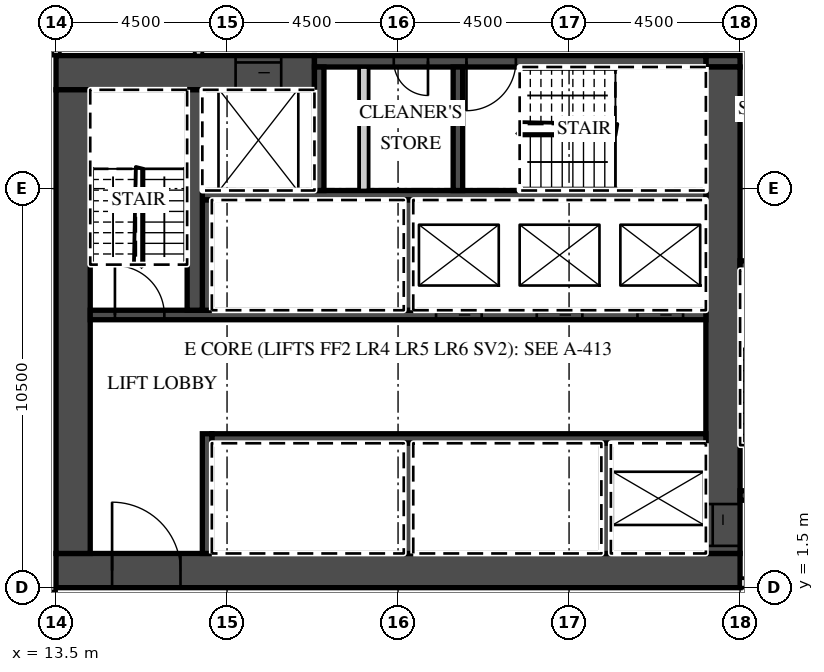
"""IFC4 building model, lengths in metres.
Left out: names, types, materials, properties, quantities, classifications, styles, units other than length and angle.
Written with IfcOpenShell. Run it as: python <this file> out.ifc"""

import sys

from ifc_helpers import new_model, si_unit, direction, frame, frame_2d, origin, place, context, subcontext, project, spatial, rectangle, extrude, element, fill, save


model = new_model("IFC4")
c1 = context("Model", 3, precision=1e-05, world=origin(), true_north=direction((0.0, 1.0)))
c2 = subcontext(c1, "Body", "Model", "MODEL_VIEW")
j1 = project(units=[si_unit("LENGTHUNIT", "METRE"), si_unit("PLANEANGLEUNIT", "RADIAN")], contexts=[c1])
p1 = place(None, origin())
s1 = spatial("IfcSite", under=j1, at=p1, CompositionType="ELEMENT")
p2 = place(p1, origin())
s2 = spatial("IfcBuilding", under=s1, at=p2, CompositionType="ELEMENT")
p3 = place(p2, frame((0.0, 0.0, 63.3)))
s3 = spatial("IfcBuildingStorey", under=s2, at=p3, CompositionType="ELEMENT", Elevation=63.3)
p4 = place(p3, frame((13.5, 15.5, 0.0), z_axis=(0.0, 0.0, 1.0), x_axis=(0.0, 1.0, 0.0)))
e1 = element("IfcWall", 1, at=p4, inside=s3, PredefinedType="PARTITIONING", context=c2, shape_type="SweptSolid", body=[
    extrude(rectangle(XDim=6.05, YDim=0.2, at=frame_2d((3.025, 0.0))), origin(), (0.0, 0.0, 1.0), 3.02),
])
p5 = place(p3, frame((-44.55, 1.3, 0.0), z_axis=(0.0, 0.0, 1.0), x_axis=(1.0, 0.0, 0.0)))
e2 = element("IfcWall", 2, at=p5, inside=s3, PredefinedType="PARTITIONING", context=c2, shape_type="SweptSolid", body=[
    extrude(rectangle(XDim=58.05, YDim=0.2, at=frame_2d((29.025, 0.0))), origin(), (0.0, 0.0, 1.0), 3.02),
])
p6 = place(p5, frame((0.525, 0.0, 0.0)))
e3 = element("IfcOpeningElement", 3, at=p6, cuts=e2, PredefinedType="OPENING", context=c2, shape_type="SweptSolid", body=[
    extrude(rectangle(XDim=1.0, YDim=2.1, at=frame_2d((0.5, 1.05))), frame((0.0, 0.11, 0.0), z_axis=(0.0, -1.0, 0.0), x_axis=(1.0, 0.0, 0.0)), (0.0, 0.0, 1.0), 0.22),
])
p7 = place(p5, frame((6.975, 0.0, 0.0)))
e4 = element("IfcOpeningElement", 4, at=p7, cuts=e2, PredefinedType="OPENING", context=c2, shape_type="SweptSolid", body=[
    extrude(rectangle(XDim=1.0, YDim=2.1, at=frame_2d((0.5, 1.05))), frame((0.0, 0.11, 0.0), z_axis=(0.0, -1.0, 0.0), x_axis=(1.0, 0.0, 0.0)), (0.0, 0.0, 1.0), 0.22),
])
p8 = place(p5, frame((10.987, 0.0, 0.0)))
e5 = element("IfcOpeningElement", 5, at=p8, cuts=e2, PredefinedType="OPENING", context=c2, shape_type="SweptSolid", body=[
    extrude(rectangle(XDim=1.2, YDim=2.1, at=frame_2d((0.6, 1.05))), frame((0.0, 0.11, 0.0), z_axis=(0.0, -1.0, 0.0), x_axis=(1.0, 0.0, 0.0)), (0.0, 0.0, 1.0), 0.22),
])
p9 = place(p5, frame((19.987, 0.0, 0.0)))
e6 = element("IfcOpeningElement", 6, at=p9, cuts=e2, PredefinedType="OPENING", context=c2, shape_type="SweptSolid", body=[
    extrude(rectangle(XDim=1.2, YDim=2.1, at=frame_2d((0.6, 1.05))), frame((0.0, 0.11, 0.0), z_axis=(0.0, -1.0, 0.0), x_axis=(1.0, 0.0, 0.0)), (0.0, 0.0, 1.0), 0.22),
])
p10 = place(p5, frame((29.5, 0.0, 0.0)))
e7 = element("IfcOpeningElement", 7, at=p10, cuts=e2, PredefinedType="OPENING", context=c2, shape_type="SweptSolid", body=[
    extrude(rectangle(XDim=1.0, YDim=2.1, at=frame_2d((0.5, 1.05))), frame((0.0, 0.11, 0.0), z_axis=(0.0, -1.0, 0.0), x_axis=(1.0, 0.0, 0.0)), (0.0, 0.0, 1.0), 0.22),
])
p11 = place(p5, frame((33.975, 0.0, 0.0)))
e8 = element("IfcOpeningElement", 8, at=p11, cuts=e2, PredefinedType="OPENING", context=c2, shape_type="SweptSolid", body=[
    extrude(rectangle(XDim=1.0, YDim=2.1, at=frame_2d((0.5, 1.05))), frame((0.0, 0.11, 0.0), z_axis=(0.0, -1.0, 0.0), x_axis=(1.0, 0.0, 0.0)), (0.0, 0.0, 1.0), 0.22),
])
p12 = place(p5, frame((40.912, 0.0, 0.0)))
e9 = element("IfcOpeningElement", 9, at=p12, cuts=e2, PredefinedType="OPENING", context=c2, shape_type="SweptSolid", body=[
    extrude(rectangle(XDim=1.2, YDim=2.1, at=frame_2d((0.6, 1.05))), frame((0.0, 0.11, 0.0), z_axis=(0.0, -1.0, 0.0), x_axis=(1.0, 0.0, 0.0)), (0.0, 0.0, 1.0), 0.22),
])
p13 = place(p5, frame((47.5, 0.0, 0.0)))
e10 = element("IfcOpeningElement", 10, at=p13, cuts=e2, PredefinedType="OPENING", context=c2, shape_type="SweptSolid", body=[
    extrude(rectangle(XDim=1.0, YDim=2.1, at=frame_2d((0.5, 1.05))), frame((0.0, 0.11, 0.0), z_axis=(0.0, -1.0, 0.0), x_axis=(1.0, 0.0, 0.0)), (0.0, 0.0, 1.0), 0.22),
])
p14 = place(p5, frame((51.975, 0.0, 0.0)))
e11 = element("IfcOpeningElement", 11, at=p14, cuts=e2, PredefinedType="OPENING", context=c2, shape_type="SweptSolid", body=[
    extrude(rectangle(XDim=1.0, YDim=2.1, at=frame_2d((0.5, 1.05))), frame((0.0, 0.11, 0.0), z_axis=(0.0, -1.0, 0.0), x_axis=(1.0, 0.0, 0.0)), (0.0, 0.0, 1.0), 0.22),
])
p15 = place(p5, frame((56.475, 0.0, 0.0)))
e12 = element("IfcOpeningElement", 12, at=p15, cuts=e2, PredefinedType="OPENING", context=c2, shape_type="SweptSolid", body=[
    extrude(rectangle(XDim=1.0, YDim=2.1, at=frame_2d((0.5, 1.05))), frame((0.0, 0.11, 0.0), z_axis=(0.0, -1.0, 0.0), x_axis=(1.0, 0.0, 0.0)), (0.0, 0.0, 1.0), 0.22),
])
p16 = place(p3, frame((13.5, 1.95, 0.0), z_axis=(0.0, 0.0, 1.0), x_axis=(1.0, 0.0, 0.0)))
e13 = element("IfcWall", 13, at=p16, inside=s3, PredefinedType="SHEAR", context=c2, shape_type="SweptSolid", body=[
    extrude(rectangle(XDim=18.0, YDim=0.9, at=frame_2d((9.0, 0.0))), origin(), (0.0, 0.0, 1.0), 3.02),
])
p17 = place(p16, frame((1.475, 0.0, 0.0)))
e14 = element("IfcOpeningElement", 14, at=p17, cuts=e13, PredefinedType="OPENING", context=c2, shape_type="SweptSolid", body=[
    extrude(rectangle(XDim=1.8, YDim=2.1, at=frame_2d((0.9, 1.05))), frame((0.0, 0.46, 0.0), z_axis=(0.0, -1.0, 0.0), x_axis=(1.0, 0.0, 0.0)), (0.0, 0.0, 1.0), 0.92),
])
p18 = place(p3, frame((13.5, 15.05, 0.0), z_axis=(0.0, 0.0, 1.0), x_axis=(1.0, 0.0, 0.0)))
e15 = element("IfcWall", 15, at=p18, inside=s3, PredefinedType="SHEAR", context=c2, shape_type="SweptSolid", body=[
    extrude(rectangle(XDim=6.8, YDim=0.9, at=frame_2d((3.4, 0.0))), origin(), (0.0, 0.0, 1.0), 3.02),
])
p19 = place(p18, frame((4.725, 0.0, 0.0)))
e16 = element("IfcOpeningElement", 16, at=p19, cuts=e15, PredefinedType="OPENING", context=c2, shape_type="SweptSolid", body=[
    extrude(rectangle(XDim=1.2, YDim=2.1, at=frame_2d((0.6, 1.05))), frame((0.0, 0.46, 0.0), z_axis=(0.0, -1.0, 0.0), x_axis=(1.0, 0.0, 0.0)), (0.0, 0.0, 1.0), 0.92),
])
p20 = place(p3, frame((30.6, 15.35, 0.0), z_axis=(0.0, 0.0, 1.0), x_axis=(1.0, 0.0, 0.0)))
e17 = element("IfcWall", 17, at=p20, inside=s3, PredefinedType="SHEAR", context=c2, shape_type="SweptSolid", body=[
    extrude(rectangle(XDim=0.9, YDim=0.3, at=frame_2d((0.45, 0.0))), origin(), (0.0, 0.0, 1.0), 3.02),
])
p21 = place(p3, frame((20.3, 15.35, 0.0), z_axis=(0.0, 0.0, 1.0), x_axis=(1.0, 0.0, 0.0)))
e18 = element("IfcWall", 18, at=p21, inside=s3, PredefinedType="SHEAR", context=c2, shape_type="SweptSolid", body=[
    extrude(rectangle(XDim=10.3, YDim=0.3, at=frame_2d((5.15, 0.0))), origin(), (0.0, 0.0, 1.0), 3.02),
])
p22 = place(p21, frame((4.0, 0.0, 0.0)))
e19 = element("IfcOpeningElement", 19, at=p22, cuts=e18, PredefinedType="OPENING", context=c2, shape_type="SweptSolid", body=[
    extrude(rectangle(XDim=1.3, YDim=2.1, at=frame_2d((0.65, 1.05))), frame((0.0, 0.16, 0.0), z_axis=(0.0, -1.0, 0.0), x_axis=(1.0, 0.0, 0.0)), (0.0, 0.0, 1.0), 0.32),
])
p23 = place(p21, frame((2.087, 0.0, 0.0)))
e20 = element("IfcOpeningElement", 20, at=p23, cuts=e18, PredefinedType="OPENING", context=c2, shape_type="SweptSolid", body=[
    extrude(rectangle(XDim=0.9, YDim=2.1, at=frame_2d((0.45, 1.05))), frame((0.0, 0.16, 0.0), z_axis=(0.0, -1.0, 0.0), x_axis=(1.0, 0.0, 0.0)), (0.0, 0.0, 1.0), 0.32),
])
p24 = place(p3, frame((31.05, 2.4, 0.0), z_axis=(0.0, 0.0, 1.0), x_axis=(0.0, 1.0, 0.0)))
e21 = element("IfcWall", 21, at=p24, inside=s3, PredefinedType="SHEAR", context=c2, shape_type="SweptSolid", body=[
    extrude(rectangle(XDim=12.8, YDim=0.9, at=frame_2d((6.4, 0.0))), origin(), (0.0, 0.0, 1.0), 3.02),
])
p25 = place(p24, frame((0.2, 0.0, 0.0)))
e22 = element("IfcOpeningElement", 22, at=p25, cuts=e21, PredefinedType="OPENING", context=c2, shape_type="SweptSolid", body=[
    extrude(rectangle(XDim=1.1, YDim=2.1, at=frame_2d((0.55, 1.05))), frame((0.0, 0.46, 0.0), z_axis=(0.0, -1.0, 0.0), x_axis=(1.0, 0.0, 0.0)), (0.0, 0.0, 1.0), 0.92),
])
p26 = place(p3, frame((13.95, 2.4, 0.0), z_axis=(0.0, 0.0, 1.0), x_axis=(0.0, 1.0, 0.0)))
e23 = element("IfcWall", 23, at=p26, inside=s3, PredefinedType="SHEAR", context=c2, shape_type="SweptSolid", body=[
    extrude(rectangle(XDim=12.2, YDim=0.9, at=frame_2d((6.1, 0.0))), origin(), (0.0, 0.0, 1.0), 3.02),
])
p27 = place(p3, frame((17.6, 5.425, 0.0), z_axis=(0.0, 0.0, 1.0), x_axis=(1.0, 0.0, 0.0)))
e24 = element("IfcWall", 24, at=p27, inside=s3, PredefinedType="SHEAR", context=c2, shape_type="SweptSolid", body=[
    extrude(rectangle(XDim=13.0, YDim=0.25, at=frame_2d((6.5, 0.0))), origin(), (0.0, 0.0, 1.0), 3.02),
])
p28 = place(p3, frame((17.475, 2.4, 0.0), z_axis=(0.0, 0.0, 1.0), x_axis=(0.0, 1.0, 0.0)))
e25 = element("IfcWall", 25, at=p28, inside=s3, PredefinedType="SHEAR", context=c2, shape_type="SweptSolid", body=[
    extrude(rectangle(XDim=3.15, YDim=0.25, at=frame_2d((1.575, 0.0))), origin(), (0.0, 0.0, 1.0), 3.02),
])
for number, where, z_axis, x_axis in (
    (26, (27.975, 2.4, 0.0), (0.0, 0.0, 1.0), (0.0, 1.0, 0.0)),
    (27, (22.775, 2.4, 0.0), (0.0, 0.0, 1.0), (0.0, 1.0, 0.0)),
):
    element("IfcWall", number, at=place(p3, frame(where, z_axis=z_axis, x_axis=x_axis)), inside=s3, PredefinedType="SHEAR", context=c2, shape_type="SweptSolid", body=[
        extrude(rectangle(XDim=2.9, YDim=0.25, at=frame_2d((1.45, 0.0))), origin(), (0.0, 0.0, 1.0), 3.02),
    ])
p29 = place(p3, frame((14.4, 8.675, 0.0), z_axis=(0.0, 0.0, 1.0), x_axis=(1.0, 0.0, 0.0)))
e28 = element("IfcWall", 28, at=p29, inside=s3, PredefinedType="SHEAR", context=c2, shape_type="SweptSolid", body=[
    extrude(rectangle(XDim=16.2, YDim=0.25, at=frame_2d((8.1, 0.0))), origin(), (0.0, 0.0, 1.0), 3.02),
])
p30 = place(p29, frame((14.4, 0.0, 0.0)))
e29 = element("IfcOpeningElement", 29, at=p30, cuts=e28, PredefinedType="OPENING", context=c2, shape_type="SweptSolid", body=[
    extrude(rectangle(XDim=1.2, YDim=2.1, at=frame_2d((0.6, 1.05))), frame((0.0, 0.135, 0.0), z_axis=(0.0, -1.0, 0.0), x_axis=(1.0, 0.0, 0.0)), (0.0, 0.0, 1.0), 0.27),
])
p31 = place(p29, frame((11.75, 0.0, 0.0)))
e30 = element("IfcOpeningElement", 30, at=p31, cuts=e28, PredefinedType="OPENING", context=c2, shape_type="SweptSolid", body=[
    extrude(rectangle(XDim=1.2, YDim=2.1, at=frame_2d((0.6, 1.05))), frame((0.0, 0.135, 0.0), z_axis=(0.0, -1.0, 0.0), x_axis=(1.0, 0.0, 0.0)), (0.0, 0.0, 1.0), 0.27),
])
p32 = place(p29, frame((9.1, 0.0, 0.0)))
e31 = element("IfcOpeningElement", 31, at=p32, cuts=e28, PredefinedType="OPENING", context=c2, shape_type="SweptSolid", body=[
    extrude(rectangle(XDim=1.2, YDim=2.1, at=frame_2d((0.6, 1.05))), frame((0.0, 0.135, 0.0), z_axis=(0.0, -1.0, 0.0), x_axis=(1.0, 0.0, 0.0)), (0.0, 0.0, 1.0), 0.27),
])
p33 = place(p29, frame((0.65, 0.0, 0.0)))
e32 = element("IfcOpeningElement", 32, at=p33, cuts=e28, PredefinedType="OPENING", context=c2, shape_type="SweptSolid", body=[
    extrude(rectangle(XDim=1.3, YDim=2.1, at=frame_2d((0.65, 1.05))), frame((0.0, 0.135, 0.0), z_axis=(0.0, -1.0, 0.0), x_axis=(1.0, 0.0, 0.0)), (0.0, 0.0, 1.0), 0.27),
])
p34 = place(p3, frame((17.35, 11.825, 0.0), z_axis=(0.0, 0.0, 1.0), x_axis=(1.0, 0.0, 0.0)))
e33 = element("IfcWall", 33, at=p34, inside=s3, PredefinedType="SHEAR", context=c2, shape_type="SweptSolid", body=[
    extrude(rectangle(XDim=13.25, YDim=0.25, at=frame_2d((6.625, 0.0))), origin(), (0.0, 0.0, 1.0), 3.02),
])
for number, where, z_axis, x_axis in (
    (34, (17.475, 8.8, 0.0), (0.0, 0.0, 1.0), (0.0, 1.0, 0.0)),
    (35, (22.775, 8.8, 0.0), (0.0, 0.0, 1.0), (0.0, 1.0, 0.0)),
):
    element("IfcWall", number, at=place(p3, frame(where, z_axis=z_axis, x_axis=x_axis)), inside=s3, PredefinedType="SHEAR", context=c2, shape_type="SweptSolid", body=[
        extrude(rectangle(XDim=2.9, YDim=0.25, at=frame_2d((1.45, 0.0))), origin(), (0.0, 0.0, 1.0), 3.02),
    ])
p35 = place(p3, frame((17.15, 8.8, 0.0), z_axis=(0.0, 0.0, 1.0), x_axis=(0.0, 1.0, 0.0)))
e36 = element("IfcWall", 36, at=p35, inside=s3, PredefinedType="SHEAR", context=c2, shape_type="SweptSolid", body=[
    extrude(rectangle(XDim=5.8, YDim=0.4, at=frame_2d((2.9, 0.0))), origin(), (0.0, 0.0, 1.0), 3.02),
])
for number, where, z_axis, x_axis in (
    (37, (20.425, 11.95, 0.0), (0.0, 0.0, 1.0), (0.0, 1.0, 0.0)),
    (38, (24.075, 11.95, 0.0), (0.0, 0.0, 1.0), (0.0, 1.0, 0.0)),
):
    element("IfcWall", number, at=place(p3, frame(where, z_axis=z_axis, x_axis=x_axis)), inside=s3, PredefinedType="SHEAR", context=c2, shape_type="SweptSolid", body=[
        extrude(rectangle(XDim=3.25, YDim=0.25, at=frame_2d((1.625, 0.0))), origin(), (0.0, 0.0, 1.0), 3.02),
    ])
p36 = place(p3, frame((21.6, 11.95, 0.0), z_axis=(0.0, 0.0, 1.0), x_axis=(0.0, 1.0, 0.0)))
e39 = element("IfcWall", 39, at=p36, inside=s3, PredefinedType="PARTITIONING", context=c2, shape_type="SweptSolid", body=[
    extrude(rectangle(XDim=3.25, YDim=0.25, at=frame_2d((1.625, 0.0))), origin(), (0.0, 0.0, 1.0), 3.02),
])
p37 = place(p3, frame((31.5, 1.625, 0.0), z_axis=(0.0, 0.0, 1.0), x_axis=(1.0, 0.0, 0.0)))
e40 = element("IfcWall", 40, at=p37, inside=s3, PredefinedType="PARTITIONING", context=c2, shape_type="SweptSolid", body=[
    extrude(rectangle(XDim=13.05, YDim=0.25, at=frame_2d((6.525, 0.0))), origin(), (0.0, 0.0, 1.0), 3.02),
])
p38 = place(p37, frame((0.625, 0.0, 0.0)))
e41 = element("IfcOpeningElement", 41, at=p38, cuts=e40, PredefinedType="OPENING", context=c2, shape_type="SweptSolid", body=[
    extrude(rectangle(XDim=1.3, YDim=2.1, at=frame_2d((0.65, 1.05))), frame((0.0, 0.135, 0.0), z_axis=(0.0, -1.0, 0.0), x_axis=(1.0, 0.0, 0.0)), (0.0, 0.0, 1.0), 0.27),
])
p39 = place(p37, frame((3.25, 0.0, 0.0)))
e42 = element("IfcOpeningElement", 42, at=p39, cuts=e40, PredefinedType="OPENING", context=c2, shape_type="SweptSolid", body=[
    extrude(rectangle(XDim=1.1, YDim=2.1, at=frame_2d((0.55, 1.05))), frame((0.0, 0.135, 0.0), z_axis=(0.0, -1.0, 0.0), x_axis=(1.0, 0.0, 0.0)), (0.0, 0.0, 1.0), 0.27),
])
p40 = place(p3, frame((31.5, 3.925, 0.0), z_axis=(0.0, 0.0, 1.0), x_axis=(1.0, 0.0, 0.0)))
e43 = element("IfcWall", 43, at=p40, inside=s3, PredefinedType="SHEAR", context=c2, shape_type="SweptSolid", body=[
    extrude(rectangle(XDim=2.55, YDim=0.25, at=frame_2d((1.275, 0.0))), origin(), (0.0, 0.0, 1.0), 3.02),
])
p41 = place(p40, frame((0.625, 0.0, 0.0)))
e44 = element("IfcOpeningElement", 44, at=p41, cuts=e43, PredefinedType="OPENING", context=c2, shape_type="SweptSolid", body=[
    extrude(rectangle(XDim=1.3, YDim=2.1, at=frame_2d((0.65, 1.05))), frame((0.0, 0.135, 0.0), z_axis=(0.0, -1.0, 0.0), x_axis=(1.0, 0.0, 0.0)), (0.0, 0.0, 1.0), 0.27),
])
p42 = place(p3, frame((31.5, 9.975, 0.0), z_axis=(0.0, 0.0, 1.0), x_axis=(1.0, 0.0, 0.0)))
e45 = element("IfcWall", 45, at=p42, inside=s3, PredefinedType="SHEAR", context=c2, shape_type="SweptSolid", body=[
    extrude(rectangle(XDim=2.55, YDim=0.25, at=frame_2d((1.275, 0.0))), origin(), (0.0, 0.0, 1.0), 3.02),
])
p43 = place(p3, frame((17.25, 15.5, 0.0), z_axis=(0.0, 0.0, 1.0), x_axis=(0.0, 1.0, 0.0)))
e46 = element("IfcWall", 46, at=p43, inside=s3, PredefinedType="PARTITIONING", context=c2, shape_type="SweptSolid", body=[
    extrude(rectangle(XDim=2.2, YDim=0.2, at=frame_2d((1.1, 0.0))), origin(), (0.0, 0.0, 1.0), 3.02),
])
p44 = place(p30, origin())
e47 = element("IfcDoor", 47, at=p44, inside=s3, OperationType="SLIDING_TO_LEFT", PredefinedType="DOOR", context=c2, shape_type="SweptSolid", body=[
    extrude(rectangle(XDim=1.2, YDim=2.1, at=frame_2d((0.6, 1.05))), frame((0.0, 0.025, 0.0), z_axis=(0.0, -1.0, 0.0), x_axis=(1.0, 0.0, 0.0)), (0.0, 0.0, 1.0), 0.05),
])
fill(e29, e47)
p45 = place(p31, origin())
e48 = element("IfcDoor", 48, at=p45, inside=s3, OperationType="SLIDING_TO_RIGHT", PredefinedType="DOOR", context=c2, shape_type="SweptSolid", body=[
    extrude(rectangle(XDim=1.2, YDim=2.1, at=frame_2d((0.6, 1.05))), frame((0.0, 0.025, 0.0), z_axis=(0.0, -1.0, 0.0), x_axis=(1.0, 0.0, 0.0)), (0.0, 0.0, 1.0), 0.05),
])
fill(e30, e48)
p46 = place(p32, origin())
e49 = element("IfcDoor", 49, at=p46, inside=s3, OperationType="SLIDING_TO_RIGHT", PredefinedType="DOOR", context=c2, shape_type="SweptSolid", body=[
    extrude(rectangle(XDim=1.2, YDim=2.1, at=frame_2d((0.6, 1.05))), frame((0.0, 0.025, 0.0), z_axis=(0.0, -1.0, 0.0), x_axis=(1.0, 0.0, 0.0)), (0.0, 0.0, 1.0), 0.05),
])
fill(e31, e49)
p47 = place(p19, origin())
e50 = element("IfcDoor", 50, at=p47, inside=s3, OperationType="SLIDING_TO_LEFT", PredefinedType="DOOR", context=c2, shape_type="SweptSolid", body=[
    extrude(rectangle(XDim=1.2, YDim=2.1, at=frame_2d((0.6, 1.05))), frame((0.0, 0.025, 0.0), z_axis=(0.0, -1.0, 0.0), x_axis=(1.0, 0.0, 0.0)), (0.0, 0.0, 1.0), 0.05),
])
fill(e16, e50)
p48 = place(p25, origin())
e51 = element("IfcDoor", 51, at=p48, inside=s3, OperationType="SLIDING_TO_LEFT", PredefinedType="DOOR", context=c2, shape_type="SweptSolid", body=[
    extrude(rectangle(XDim=1.1, YDim=2.1, at=frame_2d((0.55, 1.05))), frame((0.0, 0.025, 0.0), z_axis=(0.0, -1.0, 0.0), x_axis=(1.0, 0.0, 0.0)), (0.0, 0.0, 1.0), 0.05),
])
fill(e22, e51)
p49 = place(p17, origin())
e52 = element("IfcDoor", 52, at=p49, inside=s3, OperationType="DOUBLE_DOOR_DOUBLE_SWING", PredefinedType="DOOR", context=c2, shape_type="SweptSolid", body=[
    extrude(rectangle(XDim=1.8, YDim=2.1, at=frame_2d((0.9, 1.05))), frame((0.0, 0.025, 0.0), z_axis=(0.0, -1.0, 0.0), x_axis=(1.0, 0.0, 0.0)), (0.0, 0.0, 1.0), 0.05),
])
fill(e14, e52)
p50 = place(p33, origin())
e53 = element("IfcDoor", 53, at=p50, inside=s3, OperationType="SINGLE_SWING_LEFT", PredefinedType="DOOR", context=c2, shape_type="SweptSolid", body=[
    extrude(rectangle(XDim=1.3, YDim=2.1, at=frame_2d((0.65, 1.05))), frame((0.0, 0.025, 0.0), z_axis=(0.0, -1.0, 0.0), x_axis=(1.0, 0.0, 0.0)), (0.0, 0.0, 1.0), 0.05),
])
fill(e32, e53)
p51 = place(p22, origin())
e54 = element("IfcDoor", 54, at=p51, inside=s3, OperationType="SINGLE_SWING_LEFT", PredefinedType="DOOR", context=c2, shape_type="SweptSolid", body=[
    extrude(rectangle(XDim=1.3, YDim=2.1, at=frame_2d((0.65, 1.05))), frame((0.0, 0.025, 0.0), z_axis=(0.0, -1.0, 0.0), x_axis=(1.0, 0.0, 0.0)), (0.0, 0.0, 1.0), 0.05),
])
fill(e19, e54)
p52 = place(p23, origin())
e55 = element("IfcDoor", 55, at=p52, inside=s3, OperationType="SINGLE_SWING_RIGHT", PredefinedType="DOOR", context=c2, shape_type="SweptSolid", body=[
    extrude(rectangle(XDim=0.9, YDim=2.1, at=frame_2d((0.45, 1.05))), frame((0.0, 0.025, 0.0), z_axis=(0.0, -1.0, 0.0), x_axis=(1.0, 0.0, 0.0)), (0.0, 0.0, 1.0), 0.05),
])
fill(e20, e55)
save(model, sys.argv[1])
